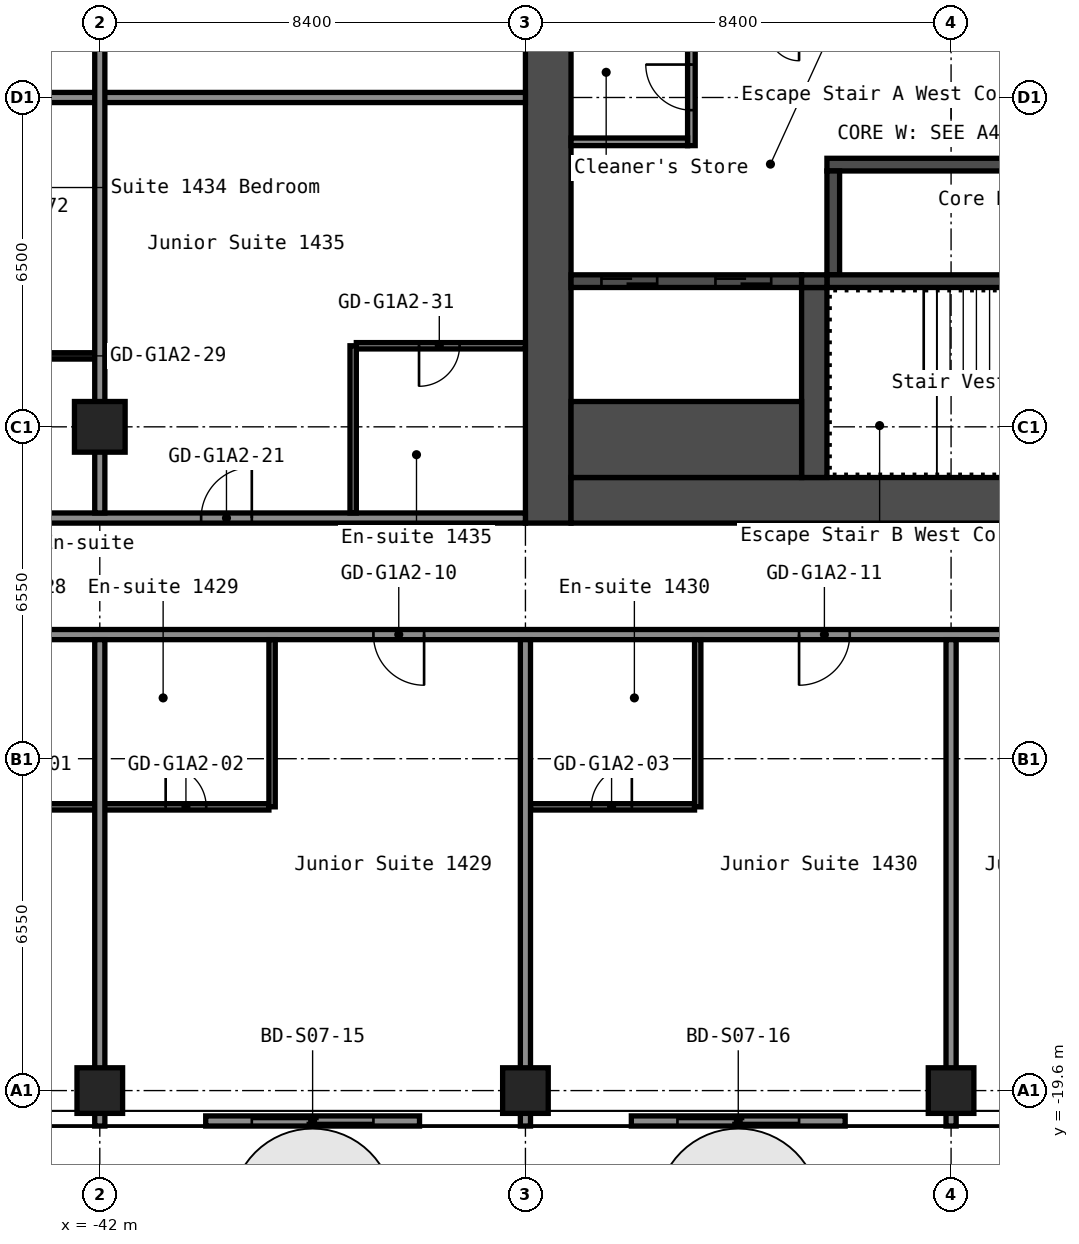
"""IFC4 building model, lengths in metres.
Left out: names, types, materials, properties, quantities, classifications, styles, units other than length and angle.
Written with IfcOpenShell. Run it as: python <this file> out.ifc"""

import sys

from ifc_helpers import new_model, si_unit, direction, frame, frame_2d, origin, origin_2d, place, context, subcontext, project, spatial, rectangle, hollow_rectangle, extrude, element, fill, save


model = new_model("IFC4")
c1 = context("Model", 3, precision=1e-05, world=origin(), true_north=direction((0.0, 1.0)))
c2 = subcontext(c1, "Body", "Model", "MODEL_VIEW")
j1 = project(units=[si_unit("LENGTHUNIT", "METRE"), si_unit("PLANEANGLEUNIT", "RADIAN")], contexts=[c1])
p1 = place(None, origin())
s1 = spatial("IfcSite", under=j1, at=p1, CompositionType="ELEMENT")
p2 = place(p1, origin())
s2 = spatial("IfcBuilding", under=s1, at=p2, CompositionType="ELEMENT")
p3 = place(p2, frame((0.0, 0.0, 51.8)))
s3 = spatial("IfcBuildingStorey", under=s2, at=p3, CompositionType="ELEMENT", Elevation=51.8)
p4 = place(p3, frame((-42.0, -19.6, 0.0), z_axis=(0.0, 0.0, 1.0), x_axis=(1.0, 0.0, 0.0)))
e1 = element("IfcColumn", 1, at=p4, inside=s3, PredefinedType="COLUMN", context=c2, shape_type="SweptSolid", body=[
    extrude(hollow_rectangle(XDim=0.9, YDim=0.9, WallThickness=0.036, at=origin_2d()), origin(), (0.0, 0.0, 1.0), 2.8),
])
p5 = place(p3, frame((-42.0, -6.5, 0.0), z_axis=(0.0, 0.0, 1.0), x_axis=(1.0, 0.0, 0.0)))
e2 = element("IfcColumn", 2, at=p5, inside=s3, PredefinedType="COLUMN", context=c2, shape_type="SweptSolid", body=[
    extrude(hollow_rectangle(XDim=1.0, YDim=1.0, WallThickness=0.04, at=origin_2d()), origin(), (0.0, 0.0, 1.0), 2.8),
])
for number, where, z_axis, x_axis in (
    (3, (-33.6, -19.6, 0.0), (0.0, 0.0, 1.0), (1.0, 0.0, 0.0)),
    (4, (-25.2, -19.6, 0.0), (0.0, 0.0, 1.0), (1.0, 0.0, 0.0)),
):
    element("IfcColumn", number, at=place(p3, frame(where, z_axis=z_axis, x_axis=x_axis)), inside=s3, PredefinedType="COLUMN", context=c2, shape_type="SweptSolid", body=[
        extrude(hollow_rectangle(XDim=0.9, YDim=0.9, WallThickness=0.036, at=origin_2d()), origin(), (0.0, 0.0, 1.0), 2.8),
    ])
p6 = place(p3, frame((-33.15, -8.4, 0.0), z_axis=(0.0, 0.0, 1.0), x_axis=(0.0, 1.0, 0.0)))
e5 = element("IfcWall", 5, at=p6, inside=s3, PredefinedType="SHEAR", context=c2, shape_type="SweptSolid", body=[
    extrude(rectangle(XDim=16.8, YDim=0.9, at=frame_2d((8.4, 0.0))), origin(), (0.0, 0.0, 1.0), 2.8),
])
p7 = place(p3, frame((-32.7, -7.95, 0.0), z_axis=(0.0, 0.0, 1.0), x_axis=(1.0, 0.0, 0.0)))
e6 = element("IfcWall", 6, at=p7, inside=s3, PredefinedType="SHEAR", context=c2, shape_type="SweptSolid", body=[
    extrude(rectangle(XDim=15.0, YDim=0.9, at=frame_2d((7.5, 0.0))), origin(), (0.0, 0.0, 1.0), 2.8),
])
p8 = place(p7, frame((11.45, 0.0, 0.0)))
e7 = element("IfcOpeningElement", 7, at=p8, cuts=e6, PredefinedType="OPENING", context=c2, shape_type="SweptSolid", body=[
    extrude(rectangle(XDim=1.0, YDim=2.1, at=frame_2d((0.5, 1.05))), frame((0.0, 0.46, 0.0), z_axis=(0.0, -1.0, 0.0), x_axis=(1.0, 0.0, 0.0)), (0.0, 0.0, 1.0), 0.92),
])
p9 = place(p3, frame((-27.65, -1.325, 0.0), z_axis=(0.0, 0.0, 1.0), x_axis=(1.0, 0.0, 0.0)))
e8 = element("IfcWall", 8, at=p9, inside=s3, PredefinedType="SHEAR", context=c2, shape_type="SweptSolid", body=[
    extrude(rectangle(XDim=7.5, YDim=0.25, at=frame_2d((3.75, 0.0))), origin(), (0.0, 0.0, 1.0), 2.8),
])
p10 = place(p3, frame((-27.525, -3.5, 0.0), z_axis=(0.0, 0.0, 1.0), x_axis=(0.0, 1.0, 0.0)))
e9 = element("IfcWall", 9, at=p10, inside=s3, PredefinedType="SHEAR", context=c2, shape_type="SweptSolid", body=[
    extrude(rectangle(XDim=2.05, YDim=0.25, at=frame_2d((1.025, 0.0))), origin(), (0.0, 0.0, 1.0), 2.8),
])
p11 = place(p3, frame((-27.65, -3.625, 0.0), z_axis=(0.0, 0.0, 1.0), x_axis=(1.0, 0.0, 0.0)))
e10 = element("IfcWall", 10, at=p11, inside=s3, PredefinedType="SHEAR", context=c2, shape_type="SweptSolid", body=[
    extrude(rectangle(XDim=7.5, YDim=0.25, at=frame_2d((3.75, 0.0))), origin(), (0.0, 0.0, 1.0), 2.8),
])
p12 = place(p3, frame((-27.9, -7.5, 0.0), z_axis=(0.0, 0.0, 1.0), x_axis=(0.0, 1.0, 0.0)))
e11 = element("IfcWall", 11, at=p12, inside=s3, PredefinedType="SHEAR", context=c2, shape_type="SweptSolid", body=[
    extrude(rectangle(XDim=3.75, YDim=0.5, at=frame_2d((1.875, 0.0))), origin(), (0.0, 0.0, 1.0), 2.8),
])
p13 = place(p3, frame((-32.7, -3.625, 0.0), z_axis=(0.0, 0.0, 1.0), x_axis=(1.0, 0.0, 0.0)))
e12 = element("IfcWall", 12, at=p13, inside=s3, PredefinedType="SHEAR", context=c2, shape_type="SweptSolid", body=[
    extrude(rectangle(XDim=4.55, YDim=0.25, at=frame_2d((2.275, 0.0))), origin(), (0.0, 0.0, 1.0), 2.8),
])
p14 = place(p13, frame((2.85, 0.0, 0.0)))
e13 = element("IfcOpeningElement", 13, at=p14, cuts=e12, PredefinedType="OPENING", context=c2, shape_type="SweptSolid", body=[
    extrude(rectangle(XDim=1.1, YDim=2.1, at=frame_2d((0.55, 1.05))), frame((0.0, 0.135, 0.0), z_axis=(0.0, -1.0, 0.0), x_axis=(1.0, 0.0, 0.0)), (0.0, 0.0, 1.0), 0.27),
])
p15 = place(p13, frame((0.6, 0.0, 0.0)))
e14 = element("IfcOpeningElement", 14, at=p15, cuts=e12, PredefinedType="OPENING", context=c2, shape_type="SweptSolid", body=[
    extrude(rectangle(XDim=1.1, YDim=2.1, at=frame_2d((0.55, 1.05))), frame((0.0, 0.135, 0.0), z_axis=(0.0, -1.0, 0.0), x_axis=(1.0, 0.0, 0.0)), (0.0, 0.0, 1.0), 0.27),
])
p16 = place(p3, frame((-32.7, -6.75, 0.0), z_axis=(0.0, 0.0, 1.0), x_axis=(1.0, 0.0, 0.0)))
e15 = element("IfcWall", 15, at=p16, inside=s3, PredefinedType="SHEAR", context=c2, shape_type="SweptSolid", body=[
    extrude(rectangle(XDim=4.55, YDim=1.5, at=frame_2d((2.275, 0.0))), origin(), (0.0, 0.0, 1.0), 2.8),
])
p17 = place(p3, frame((-28.15, -3.625, 0.0), z_axis=(0.0, 0.0, 1.0), x_axis=(1.0, 0.0, 0.0)))
e16 = element("IfcWall", 16, at=p17, inside=s3, PredefinedType="SHEAR", context=c2, shape_type="SweptSolid", body=[
    extrude(rectangle(XDim=0.5, YDim=0.25, at=frame_2d((0.25, 0.0))), origin(), (0.0, 0.0, 1.0), 2.8),
])
p18 = place(p3, frame((-30.325, -0.95, 0.0), z_axis=(0.0, 0.0, 1.0), x_axis=(0.0, 1.0, 0.0)))
e17 = element("IfcWall", 17, at=p18, inside=s3, PredefinedType="PARTITIONING", context=c2, shape_type="SweptSolid", body=[
    extrude(rectangle(XDim=2.15, YDim=0.15, at=frame_2d((1.075, 0.0))), origin(), (0.0, 0.0, 1.0), 2.8),
])
p19 = place(p18, frame((0.7, 0.0, 0.0)))
e18 = element("IfcOpeningElement", 18, at=p19, cuts=e17, PredefinedType="OPENING", context=c2, shape_type="SweptSolid", body=[
    extrude(rectangle(XDim=0.9, YDim=2.1, at=frame_2d((0.45, 1.05))), frame((0.0, 0.085, 0.0), z_axis=(0.0, -1.0, 0.0), x_axis=(1.0, 0.0, 0.0)), (0.0, 0.0, 1.0), 0.17),
])
p20 = place(p3, frame((-32.7, -0.875, 0.0), z_axis=(0.0, 0.0, 1.0), x_axis=(1.0, 0.0, 0.0)))
e19 = element("IfcWall", 19, at=p20, inside=s3, PredefinedType="PARTITIONING", context=c2, shape_type="SweptSolid", body=[
    extrude(rectangle(XDim=2.3, YDim=0.15, at=frame_2d((1.15, 0.0))), origin(), (0.0, 0.0, 1.0), 2.8),
])
p21 = place(p3, frame((-45.337, -14.0, 0.0), z_axis=(0.0, 0.0, 1.0), x_axis=(1.0, 0.0, 0.0)))
e20 = element("IfcWall", 20, at=p21, inside=s3, PredefinedType="PARTITIONING", context=c2, shape_type="SweptSolid", body=[
    extrude(rectangle(XDim=6.675, YDim=0.125, at=frame_2d((3.337, 0.0))), origin(), (0.0, 0.0, 1.0), 2.8),
])
p22 = place(p21, frame((1.238, 0.0, 0.0)))
e21 = element("IfcOpeningElement", 21, at=p22, cuts=e20, PredefinedType="OPENING", context=c2, shape_type="SweptSolid", body=[
    extrude(rectangle(XDim=0.8, YDim=2.1, at=frame_2d((0.4, 1.05))), frame((0.0, 0.073, 0.0), z_axis=(0.0, -1.0, 0.0), x_axis=(1.0, 0.0, 0.0)), (0.0, 0.0, 1.0), 0.145),
])
p23 = place(p21, frame((4.637, 0.0, 0.0)))
e22 = element("IfcOpeningElement", 22, at=p23, cuts=e20, PredefinedType="OPENING", context=c2, shape_type="SweptSolid", body=[
    extrude(rectangle(XDim=0.8, YDim=2.1, at=frame_2d((0.4, 1.05))), frame((0.0, 0.073, 0.0), z_axis=(0.0, -1.0, 0.0), x_axis=(1.0, 0.0, 0.0)), (0.0, 0.0, 1.0), 0.145),
])
p24 = place(p3, frame((-33.5, -14.0, 0.0), z_axis=(0.0, 0.0, 1.0), x_axis=(1.0, 0.0, 0.0)))
e23 = element("IfcWall", 23, at=p24, inside=s3, PredefinedType="PARTITIONING", context=c2, shape_type="SweptSolid", body=[
    extrude(rectangle(XDim=3.238, YDim=0.125, at=frame_2d((1.619, 0.0))), origin(), (0.0, 0.0, 1.0), 2.8),
])
p25 = place(p24, frame((1.2, 0.0, 0.0)))
e24 = element("IfcOpeningElement", 24, at=p25, cuts=e23, PredefinedType="OPENING", context=c2, shape_type="SweptSolid", body=[
    extrude(rectangle(XDim=0.8, YDim=2.1, at=frame_2d((0.4, 1.05))), frame((0.0, 0.073, 0.0), z_axis=(0.0, -1.0, 0.0), x_axis=(1.0, 0.0, 0.0)), (0.0, 0.0, 1.0), 0.145),
])
p26 = place(p3, frame((-51.1, -10.6, 0.0), z_axis=(0.0, 0.0, 1.0), x_axis=(1.0, 0.0, 0.0)))
e25 = element("IfcWall", 25, at=p26, inside=s3, PredefinedType="PARTITIONING", context=c2, shape_type="SweptSolid", body=[
    extrude(rectangle(XDim=34.3, YDim=0.2, at=frame_2d((17.15, 0.0))), origin(), (0.0, 0.0, 1.0), 2.8),
])
p27 = place(p26, frame((2.5, 0.0, 0.0)))
e26 = element("IfcOpeningElement", 26, at=p27, cuts=e25, PredefinedType="OPENING", context=c2, shape_type="SweptSolid", body=[
    extrude(rectangle(XDim=1.0, YDim=2.1, at=frame_2d((0.5, 1.05))), frame((0.0, 0.11, 0.0), z_axis=(0.0, -1.0, 0.0), x_axis=(1.0, 0.0, 0.0)), (0.0, 0.0, 1.0), 0.22),
])
p28 = place(p26, frame((14.5, 0.0, 0.0)))
e27 = element("IfcOpeningElement", 27, at=p28, cuts=e25, PredefinedType="OPENING", context=c2, shape_type="SweptSolid", body=[
    extrude(rectangle(XDim=1.0, YDim=2.1, at=frame_2d((0.5, 1.05))), frame((0.0, 0.11, 0.0), z_axis=(0.0, -1.0, 0.0), x_axis=(1.0, 0.0, 0.0)), (0.0, 0.0, 1.0), 0.22),
])
p29 = place(p26, frame((22.9, 0.0, 0.0)))
e28 = element("IfcOpeningElement", 28, at=p29, cuts=e25, PredefinedType="OPENING", context=c2, shape_type="SweptSolid", body=[
    extrude(rectangle(XDim=1.0, YDim=2.1, at=frame_2d((0.5, 1.05))), frame((0.0, 0.11, 0.0), z_axis=(0.0, -1.0, 0.0), x_axis=(1.0, 0.0, 0.0)), (0.0, 0.0, 1.0), 0.22),
])
p30 = place(p26, frame((27.9, 0.0, 0.0)))
e29 = element("IfcOpeningElement", 29, at=p30, cuts=e25, PredefinedType="OPENING", context=c2, shape_type="SweptSolid", body=[
    extrude(rectangle(XDim=1.0, YDim=2.1, at=frame_2d((0.5, 1.05))), frame((0.0, 0.11, 0.0), z_axis=(0.0, -1.0, 0.0), x_axis=(1.0, 0.0, 0.0)), (0.0, 0.0, 1.0), 0.22),
])
p31 = place(p3, frame((-48.6, -8.3, 0.0), z_axis=(0.0, 0.0, 1.0), x_axis=(1.0, 0.0, 0.0)))
e30 = element("IfcWall", 30, at=p31, inside=s3, PredefinedType="PARTITIONING", context=c2, shape_type="SweptSolid", body=[
    extrude(rectangle(XDim=15.0, YDim=0.2, at=frame_2d((7.5, 0.0))), origin(), (0.0, 0.0, 1.0), 2.8),
])
p32 = place(p31, frame((1.15, 0.0, 0.0)))
e31 = element("IfcOpeningElement", 31, at=p32, cuts=e30, PredefinedType="OPENING", context=c2, shape_type="SweptSolid", body=[
    extrude(rectangle(XDim=1.0, YDim=2.1, at=frame_2d((0.5, 1.05))), frame((0.0, 0.11, 0.0), z_axis=(0.0, -1.0, 0.0), x_axis=(1.0, 0.0, 0.0)), (0.0, 0.0, 1.0), 0.22),
])
p33 = place(p31, frame((8.6, 0.0, 0.0)))
e32 = element("IfcOpeningElement", 32, at=p33, cuts=e30, PredefinedType="OPENING", context=c2, shape_type="SweptSolid", body=[
    extrude(rectangle(XDim=1.0, YDim=2.1, at=frame_2d((0.5, 1.05))), frame((0.0, 0.11, 0.0), z_axis=(0.0, -1.0, 0.0), x_axis=(1.0, 0.0, 0.0)), (0.0, 0.0, 1.0), 0.22),
])
p34 = place(p3, frame((-44.938, -5.1, 0.0), z_axis=(0.0, 0.0, 1.0), x_axis=(1.0, 0.0, 0.0)))
e33 = element("IfcWall", 33, at=p34, inside=s3, PredefinedType="PARTITIONING", context=c2, shape_type="SweptSolid", body=[
    extrude(rectangle(XDim=2.837, YDim=0.125, at=frame_2d((1.419, 0.0))), origin(), (0.0, 0.0, 1.0), 2.8),
])
p35 = place(p34, frame((1.038, 0.0, 0.0)))
e34 = element("IfcOpeningElement", 34, at=p35, cuts=e33, PredefinedType="OPENING", context=c2, shape_type="SweptSolid", body=[
    extrude(rectangle(XDim=0.8, YDim=2.1, at=frame_2d((0.4, 1.05))), frame((0.0, 0.073, 0.0), z_axis=(0.0, -1.0, 0.0), x_axis=(1.0, 0.0, 0.0)), (0.0, 0.0, 1.0), 0.145),
])
p36 = place(p3, frame((-36.938, -4.9, 0.0), z_axis=(0.0, 0.0, 1.0), x_axis=(1.0, 0.0, 0.0)))
e35 = element("IfcWall", 35, at=p36, inside=s3, PredefinedType="PARTITIONING", context=c2, shape_type="SweptSolid", body=[
    extrude(rectangle(XDim=3.337, YDim=0.125, at=frame_2d((1.669, 0.0))), origin(), (0.0, 0.0, 1.0), 2.8),
])
p37 = place(p36, frame((1.238, 0.0, 0.0)))
e36 = element("IfcOpeningElement", 36, at=p37, cuts=e35, PredefinedType="OPENING", context=c2, shape_type="SweptSolid", body=[
    extrude(rectangle(XDim=0.8, YDim=2.1, at=frame_2d((0.4, 1.05))), frame((0.0, 0.073, 0.0), z_axis=(0.0, -1.0, 0.0), x_axis=(1.0, 0.0, 0.0)), (0.0, 0.0, 1.0), 0.145),
])
p38 = place(p3, frame((-48.5, 0.0, 0.0), z_axis=(0.0, 0.0, 1.0), x_axis=(1.0, 0.0, 0.0)))
e37 = element("IfcWall", 37, at=p38, inside=s3, PredefinedType="PARTITIONING", context=c2, shape_type="SweptSolid", body=[
    extrude(rectangle(XDim=14.9, YDim=0.2, at=frame_2d((7.45, 0.0))), origin(), (0.0, 0.0, 1.0), 2.8),
])
p39 = place(p3, frame((-42.0, -20.3, 0.0), z_axis=(0.0, 0.0, 1.0), x_axis=(0.0, 1.0, 0.0)))
e38 = element("IfcWall", 38, at=p39, inside=s3, PredefinedType="PARTITIONING", context=c2, shape_type="SweptSolid", body=[
    extrude(rectangle(XDim=9.6, YDim=0.2, at=frame_2d((4.8, 0.0))), origin(), (0.0, 0.0, 1.0), 2.8),
])
p40 = place(p3, frame((-42.0, -8.2, 0.0), z_axis=(0.0, 0.0, 1.0), x_axis=(0.0, 1.0, 0.0)))
e39 = element("IfcWall", 39, at=p40, inside=s3, PredefinedType="PARTITIONING", context=c2, shape_type="SweptSolid", body=[
    extrude(rectangle(XDim=16.4, YDim=0.2, at=frame_2d((8.2, 0.0))), origin(), (0.0, 0.0, 1.0), 2.8),
])
for number, where, z_axis, x_axis in (
    (40, (-38.6, -14.0, 0.0), (0.0, 0.0, 1.0), (0.0, 1.0, 0.0)),
    (41, (-37.0, -8.2, 0.0), (0.0, 0.0, 1.0), (0.0, 1.0, 0.0)),
):
    element("IfcWall", number, at=place(p3, frame(where, z_axis=z_axis, x_axis=x_axis)), inside=s3, PredefinedType="PARTITIONING", context=c2, shape_type="SweptSolid", body=[
        extrude(rectangle(XDim=3.3, YDim=0.125, at=frame_2d((1.65, 0.0))), origin(), (0.0, 0.0, 1.0), 2.8),
    ])
p41 = place(p3, frame((-33.6, -20.3, 0.0), z_axis=(0.0, 0.0, 1.0), x_axis=(0.0, 1.0, 0.0)))
e42 = element("IfcWall", 42, at=p41, inside=s3, PredefinedType="PARTITIONING", context=c2, shape_type="SweptSolid", body=[
    extrude(rectangle(XDim=9.6, YDim=0.2, at=frame_2d((4.8, 0.0))), origin(), (0.0, 0.0, 1.0), 2.8),
])
p42 = place(p3, frame((-30.2, -14.0, 0.0), z_axis=(0.0, 0.0, 1.0), x_axis=(0.0, 1.0, 0.0)))
e43 = element("IfcWall", 43, at=p42, inside=s3, PredefinedType="PARTITIONING", context=c2, shape_type="SweptSolid", body=[
    extrude(rectangle(XDim=3.3, YDim=0.125, at=frame_2d((1.65, 0.0))), origin(), (0.0, 0.0, 1.0), 2.8),
])
p43 = place(p3, frame((-25.2, -20.3, 0.0), z_axis=(0.0, 0.0, 1.0), x_axis=(0.0, 1.0, 0.0)))
e44 = element("IfcWall", 44, at=p43, inside=s3, PredefinedType="PARTITIONING", context=c2, shape_type="SweptSolid", body=[
    extrude(rectangle(XDim=9.6, YDim=0.2, at=frame_2d((4.8, 0.0))), origin(), (0.0, 0.0, 1.0), 2.8),
])
p44 = place(p3, frame((-39.91, -20.2, 0.0), z_axis=(0.0, 0.0, 1.0), x_axis=(1.0, 0.0, 0.0)))
p45 = place(p44, frame((0.91, 0.0, 0.0)))
p46 = place(p45, frame((2.4, 0.0, 0.0), z_axis=(0.0, 0.0, 1.0), x_axis=(-1.0, 0.0, 0.0)))
e45 = element("IfcDoor", 45, at=p46, inside=s3, OperationType="SLIDING_TO_LEFT", PredefinedType="DOOR", context=c2, shape_type="SweptSolid", body=[
    extrude(rectangle(XDim=2.4, YDim=2.2, at=frame_2d((1.2, 1.1))), frame((0.0, 0.025, 0.0), z_axis=(0.0, -1.0, 0.0), x_axis=(1.0, 0.0, 0.0)), (0.0, 0.0, 1.0), 0.05),
])
p47 = place(p3, frame((-31.51, -20.2, 0.0), z_axis=(0.0, 0.0, 1.0), x_axis=(1.0, 0.0, 0.0)))
p48 = place(p47, frame((0.91, 0.0, 0.0)))
p49 = place(p48, frame((2.4, 0.0, 0.0), z_axis=(0.0, 0.0, 1.0), x_axis=(-1.0, 0.0, 0.0)))
e46 = element("IfcDoor", 46, at=p49, inside=s3, OperationType="SLIDING_TO_LEFT", PredefinedType="DOOR", context=c2, shape_type="SweptSolid", body=[
    extrude(rectangle(XDim=2.4, YDim=2.2, at=frame_2d((1.2, 1.1))), frame((0.0, 0.025, 0.0), z_axis=(0.0, -1.0, 0.0), x_axis=(1.0, 0.0, 0.0)), (0.0, 0.0, 1.0), 0.05),
])
p50 = place(p19, origin())
e47 = element("IfcDoor", 47, at=p50, inside=s3, OperationType="SINGLE_SWING_LEFT", PredefinedType="DOOR", context=c2, shape_type="SweptSolid", body=[
    extrude(rectangle(XDim=0.9, YDim=2.1, at=frame_2d((0.45, 1.05))), frame((0.0, 0.025, 0.0), z_axis=(0.0, -1.0, 0.0), x_axis=(1.0, 0.0, 0.0)), (0.0, 0.0, 1.0), 0.05),
])
fill(e18, e47)
p51 = place(p14, origin())
e48 = element("IfcDoor", 48, at=p51, inside=s3, OperationType="DOUBLE_DOOR_SLIDING", PredefinedType="DOOR", context=c2, shape_type="SweptSolid", body=[
    extrude(rectangle(XDim=1.1, YDim=2.1, at=frame_2d((0.55, 1.05))), frame((0.0, 0.025, 0.0), z_axis=(0.0, -1.0, 0.0), x_axis=(1.0, 0.0, 0.0)), (0.0, 0.0, 1.0), 0.05),
])
fill(e13, e48)
p52 = place(p15, origin())
e49 = element("IfcDoor", 49, at=p52, inside=s3, OperationType="DOUBLE_DOOR_SLIDING", PredefinedType="DOOR", context=c2, shape_type="SweptSolid", body=[
    extrude(rectangle(XDim=1.1, YDim=2.1, at=frame_2d((0.55, 1.05))), frame((0.0, 0.025, 0.0), z_axis=(0.0, -1.0, 0.0), x_axis=(1.0, 0.0, 0.0)), (0.0, 0.0, 1.0), 0.05),
])
fill(e14, e49)
p53 = place(p23, origin())
e50 = element("IfcDoor", 50, at=p53, inside=s3, OperationType="SINGLE_SWING_RIGHT", PredefinedType="DOOR", context=c2, shape_type="SweptSolid", body=[
    extrude(rectangle(XDim=0.8, YDim=2.1, at=frame_2d((0.4, 1.05))), frame((0.0, 0.025, 0.0), z_axis=(0.0, -1.0, 0.0), x_axis=(1.0, 0.0, 0.0)), (0.0, 0.0, 1.0), 0.05),
])
fill(e22, e50)
p54 = place(p25, origin())
e51 = element("IfcDoor", 51, at=p54, inside=s3, OperationType="SINGLE_SWING_LEFT", PredefinedType="DOOR", context=c2, shape_type="SweptSolid", body=[
    extrude(rectangle(XDim=0.8, YDim=2.1, at=frame_2d((0.4, 1.05))), frame((0.0, 0.025, 0.0), z_axis=(0.0, -1.0, 0.0), x_axis=(1.0, 0.0, 0.0)), (0.0, 0.0, 1.0), 0.05),
])
fill(e24, e51)
p55 = place(p28, origin())
e52 = element("IfcDoor", 52, at=p55, inside=s3, OperationType="SINGLE_SWING_RIGHT", PredefinedType="DOOR", context=c2, shape_type="SweptSolid", body=[
    extrude(rectangle(XDim=1.0, YDim=2.1, at=frame_2d((0.5, 1.05))), frame((0.0, 0.025, 0.0), z_axis=(0.0, -1.0, 0.0), x_axis=(1.0, 0.0, 0.0)), (0.0, 0.0, 1.0), 0.05),
])
fill(e27, e52)
p56 = place(p29, origin())
e53 = element("IfcDoor", 53, at=p56, inside=s3, OperationType="SINGLE_SWING_LEFT", PredefinedType="DOOR", context=c2, shape_type="SweptSolid", body=[
    extrude(rectangle(XDim=1.0, YDim=2.1, at=frame_2d((0.5, 1.05))), frame((0.0, 0.025, 0.0), z_axis=(0.0, -1.0, 0.0), x_axis=(1.0, 0.0, 0.0)), (0.0, 0.0, 1.0), 0.05),
])
fill(e28, e53)
p57 = place(p33, origin())
e54 = element("IfcDoor", 54, at=p57, inside=s3, OperationType="SINGLE_SWING_LEFT", PredefinedType="DOOR", context=c2, shape_type="SweptSolid", body=[
    extrude(rectangle(XDim=1.0, YDim=2.1, at=frame_2d((0.5, 1.05))), frame((0.0, 0.025, 0.0), z_axis=(0.0, -1.0, 0.0), x_axis=(1.0, 0.0, 0.0)), (0.0, 0.0, 1.0), 0.05),
])
fill(e32, e54)
p58 = place(p37, origin())
e55 = element("IfcDoor", 55, at=p58, inside=s3, OperationType="SINGLE_SWING_LEFT", PredefinedType="DOOR", context=c2, shape_type="SweptSolid", body=[
    extrude(rectangle(XDim=0.8, YDim=2.1, at=frame_2d((0.4, 1.05))), frame((0.0, 0.025, 0.0), z_axis=(0.0, -1.0, 0.0), x_axis=(1.0, 0.0, 0.0)), (0.0, 0.0, 1.0), 0.05),
])
fill(e36, e55)
save(model, sys.argv[1])
